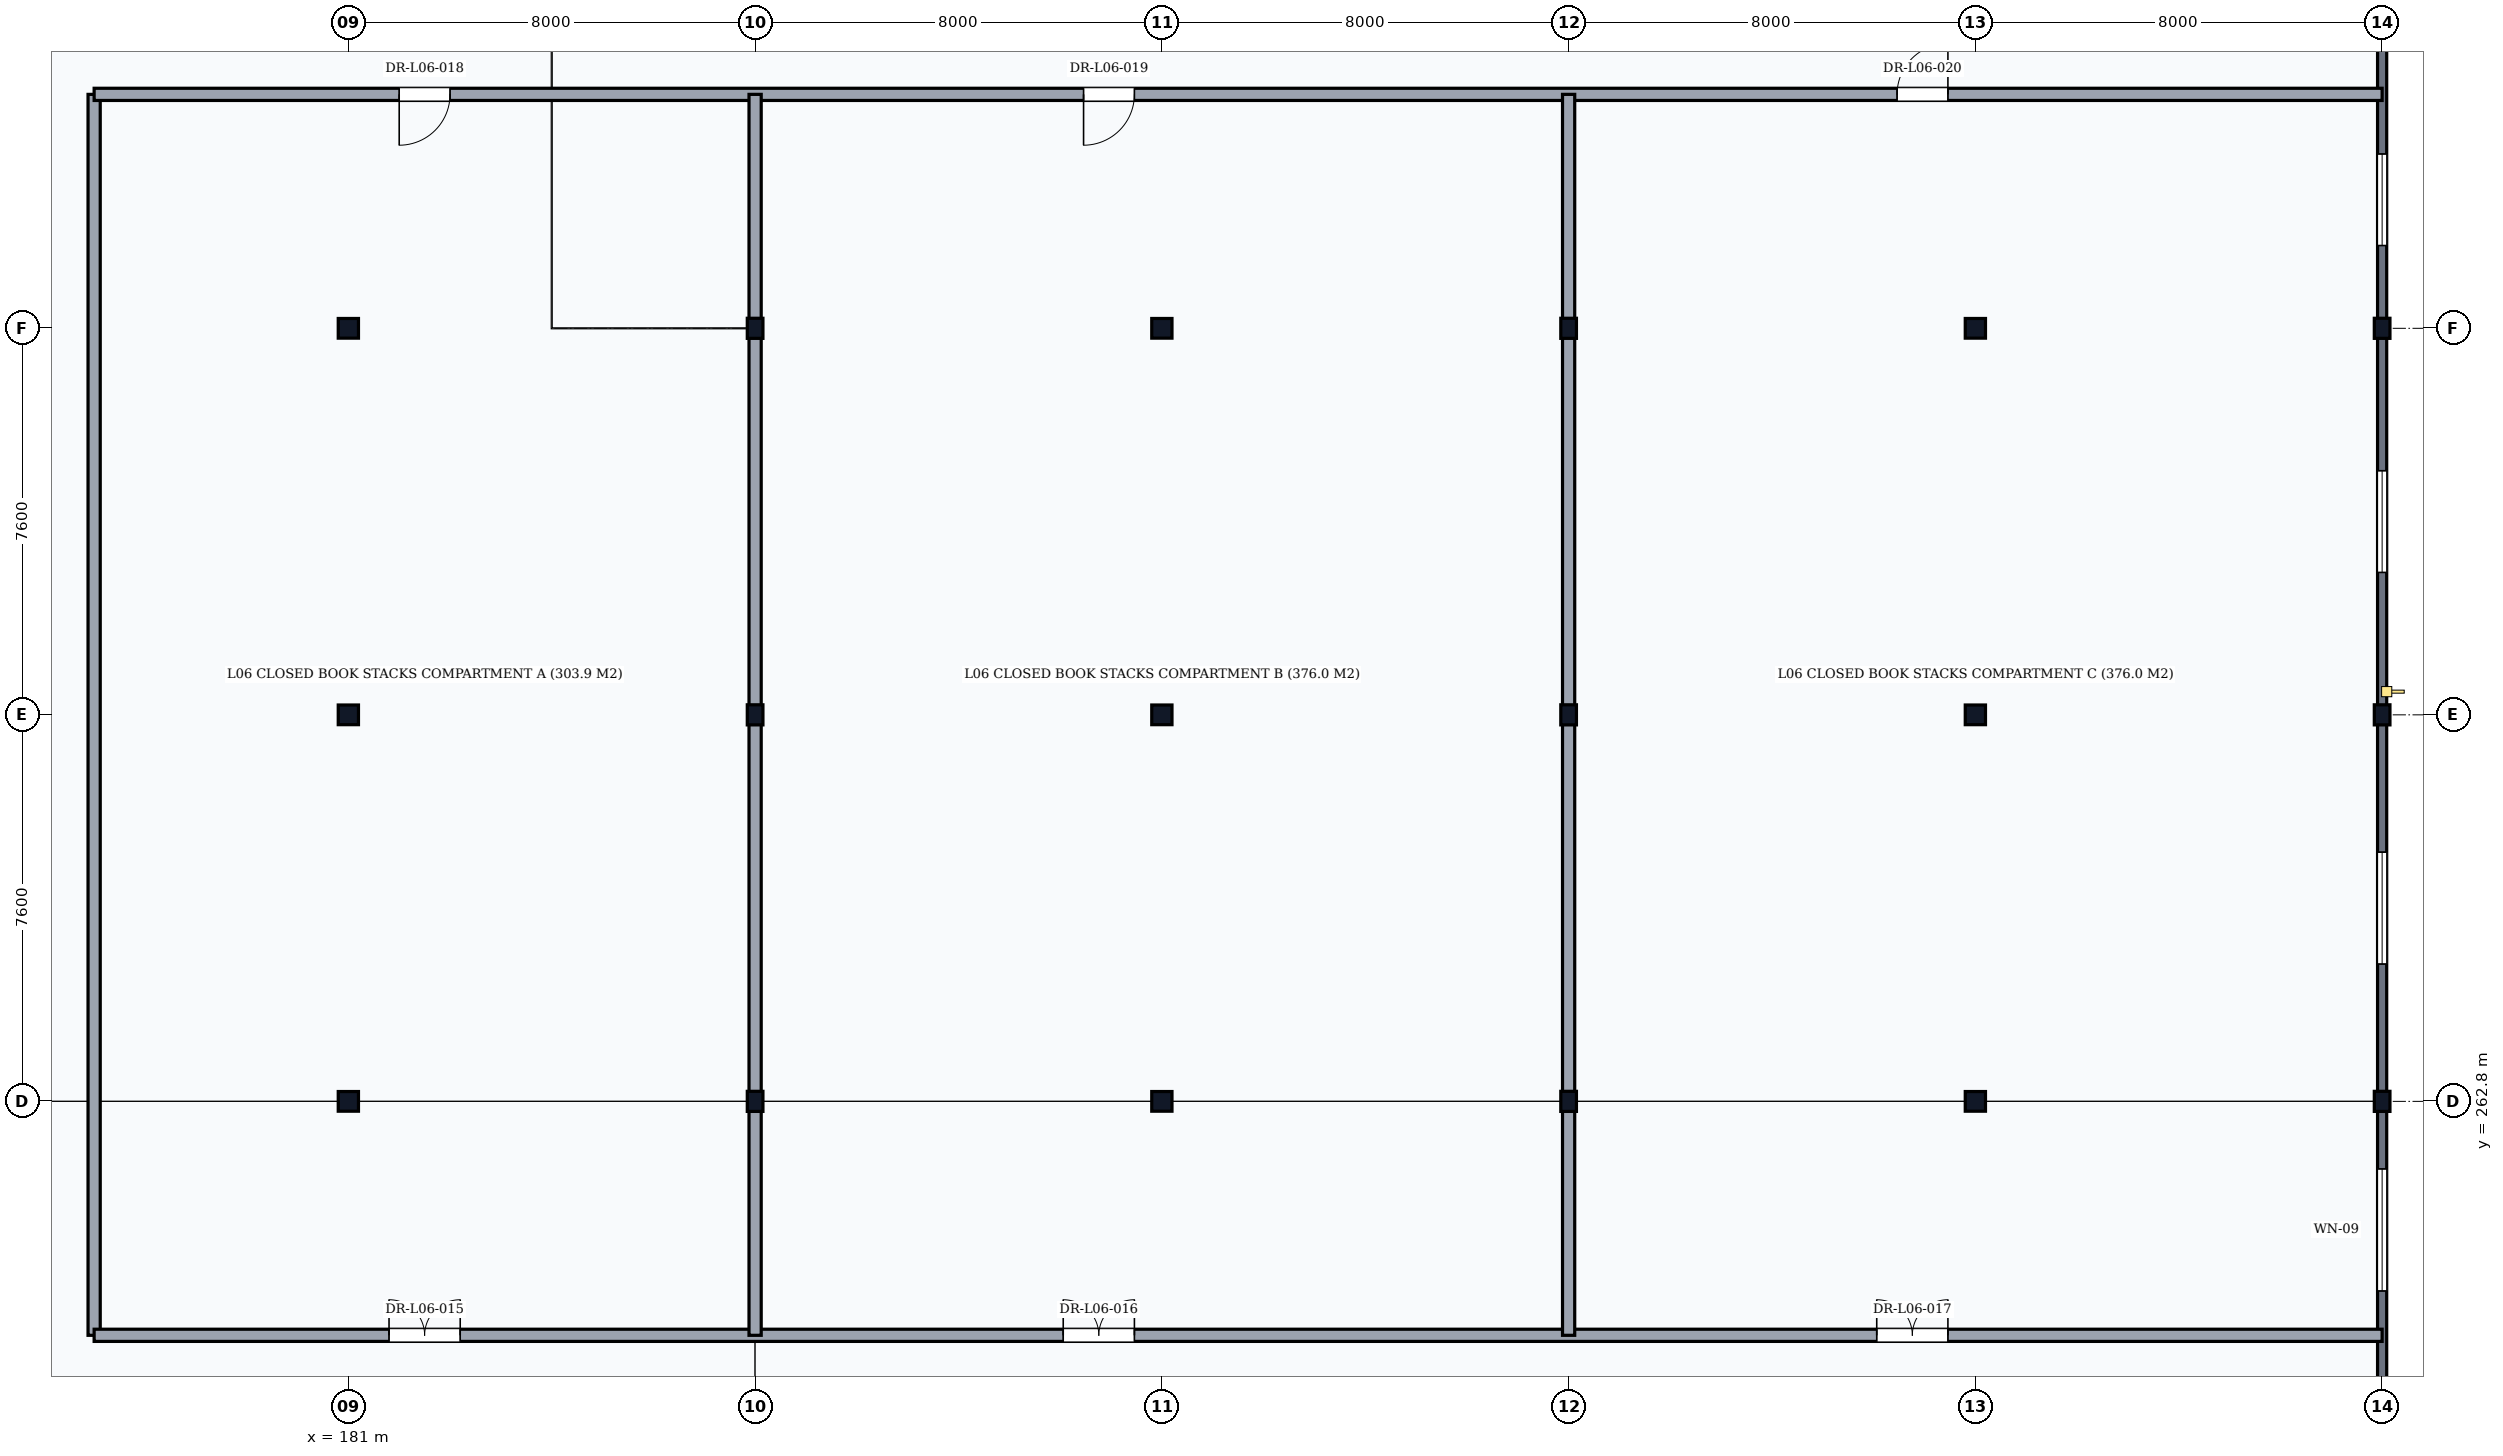
"""IFC4 building model, lengths in metres.
Left out: names, types, materials, properties, quantities, classifications, styles, units other than length and angle.
Written with IfcOpenShell. Run it as: python <this file> out.ifc"""

import sys

from ifc_helpers import new_model, si_unit, direction, frame, frame_2d, origin, origin_2d, place, context, subcontext, project, spatial, rectangle, i_section, extrude, element, fill, save


model = new_model("IFC4")
c1 = context("Model", 3, precision=1e-05, world=origin(), true_north=direction((0.0, 1.0)))
c2 = subcontext(c1, "Body", "Model", "MODEL_VIEW")
j1 = project(units=[si_unit("LENGTHUNIT", "METRE"), si_unit("PLANEANGLEUNIT", "RADIAN")], contexts=[c1])
p1 = place(None, origin())
s1 = spatial("IfcSite", under=j1, at=p1, CompositionType="ELEMENT")
p2 = place(p1, origin())
s2 = spatial("IfcBuilding", under=s1, at=p2, CompositionType="ELEMENT")
p3 = place(p2, frame((0.0, 0.0, 24.3)))
s3 = spatial("IfcBuildingStorey", under=s2, at=p3, CompositionType="ELEMENT", Elevation=24.3)
for number, where, z_axis, x_axis in (
    (1, (181.0, 262.8, 0.0), (0.0, 0.0, 1.0), (1.0, 0.0, 0.0)),
    (2, (181.0, 270.4, 0.0), (0.0, 0.0, 1.0), (1.0, 0.0, 0.0)),
    (3, (181.0, 278.0, 0.0), (0.0, 0.0, 1.0), (1.0, 0.0, 0.0)),
):
    element("IfcColumn", number, at=place(p3, frame(where, z_axis=z_axis, x_axis=x_axis)), inside=s3, PredefinedType="COLUMN", context=c2, shape_type="SweptSolid", body=[
        extrude(i_section(OverallWidth=0.398, OverallDepth=0.387, WebThickness=0.021, FlangeThickness=0.033, FilletRadius=0.015, at=origin_2d()), origin(), (0.0, 0.0, 1.0), 3.9),
    ])
for number, where, z_axis, x_axis in (
    (4, (189.0, 262.8, 0.0), (0.0, 0.0, 1.0), (1.0, 0.0, 0.0)),
    (5, (189.0, 270.4, 0.0), (0.0, 0.0, 1.0), (1.0, 0.0, 0.0)),
    (6, (189.0, 278.0, 0.0), (0.0, 0.0, 1.0), (1.0, 0.0, 0.0)),
):
    element("IfcColumn", number, at=place(p3, frame(where, z_axis=z_axis, x_axis=x_axis)), inside=s3, PredefinedType="COLUMN", context=c2, shape_type="SweptSolid", body=[
        extrude(i_section(OverallWidth=0.308, OverallDepth=0.395, WebThickness=0.021, FlangeThickness=0.04, FilletRadius=0.027, at=origin_2d()), origin(), (0.0, 0.0, 1.0), 3.9),
    ])
for number, where, z_axis, x_axis in (
    (7, (197.0, 262.8, 0.0), (0.0, 0.0, 1.0), (1.0, 0.0, 0.0)),
    (8, (197.0, 270.4, 0.0), (0.0, 0.0, 1.0), (1.0, 0.0, 0.0)),
    (9, (197.0, 278.0, 0.0), (0.0, 0.0, 1.0), (1.0, 0.0, 0.0)),
):
    element("IfcColumn", number, at=place(p3, frame(where, z_axis=z_axis, x_axis=x_axis)), inside=s3, PredefinedType="COLUMN", context=c2, shape_type="SweptSolid", body=[
        extrude(i_section(OverallWidth=0.398, OverallDepth=0.387, WebThickness=0.021, FlangeThickness=0.033, FilletRadius=0.015, at=origin_2d()), origin(), (0.0, 0.0, 1.0), 3.9),
    ])
for number, where, z_axis, x_axis in (
    (10, (205.0, 262.8, 0.0), (0.0, 0.0, 1.0), (1.0, 0.0, 0.0)),
    (11, (205.0, 270.4, 0.0), (0.0, 0.0, 1.0), (1.0, 0.0, 0.0)),
    (12, (205.0, 278.0, 0.0), (0.0, 0.0, 1.0), (1.0, 0.0, 0.0)),
):
    element("IfcColumn", number, at=place(p3, frame(where, z_axis=z_axis, x_axis=x_axis)), inside=s3, PredefinedType="COLUMN", context=c2, shape_type="SweptSolid", body=[
        extrude(i_section(OverallWidth=0.308, OverallDepth=0.395, WebThickness=0.021, FlangeThickness=0.04, FilletRadius=0.027, at=origin_2d()), origin(), (0.0, 0.0, 1.0), 3.9),
    ])
for number, where, z_axis, x_axis in (
    (13, (213.0, 262.8, 0.0), (0.0, 0.0, 1.0), (1.0, 0.0, 0.0)),
    (14, (213.0, 270.4, 0.0), (0.0, 0.0, 1.0), (1.0, 0.0, 0.0)),
    (15, (213.0, 278.0, 0.0), (0.0, 0.0, 1.0), (1.0, 0.0, 0.0)),
):
    element("IfcColumn", number, at=place(p3, frame(where, z_axis=z_axis, x_axis=x_axis)), inside=s3, PredefinedType="COLUMN", context=c2, shape_type="SweptSolid", body=[
        extrude(i_section(OverallWidth=0.398, OverallDepth=0.387, WebThickness=0.021, FlangeThickness=0.033, FilletRadius=0.015, at=origin_2d()), origin(), (0.0, 0.0, 1.0), 3.9),
    ])
for number, where, z_axis, x_axis in (
    (16, (221.0, 262.8, 0.0), (0.0, 0.0, 1.0), (1.0, 0.0, 0.0)),
    (17, (221.0, 270.4, 0.0), (0.0, 0.0, 1.0), (1.0, 0.0, 0.0)),
    (18, (221.0, 278.0, 0.0), (0.0, 0.0, 1.0), (1.0, 0.0, 0.0)),
):
    element("IfcColumn", number, at=place(p3, frame(where, z_axis=z_axis, x_axis=x_axis)), inside=s3, PredefinedType="COLUMN", context=c2, shape_type="SweptSolid", body=[
        extrude(i_section(OverallWidth=0.308, OverallDepth=0.395, WebThickness=0.021, FlangeThickness=0.04, FilletRadius=0.027, at=origin_2d()), origin(), (0.0, 0.0, 1.0), 3.9),
    ])
p4 = place(p3, frame((221.0, 255.206, 0.0), z_axis=(0.0, 0.0, 1.0), x_axis=(0.0, 1.0, 0.0)))
e19 = element("IfcWall", 19, at=p4, inside=s3, PredefinedType="SOLIDWALL", context=c2, shape_type="SweptSolid", body=[
    extrude(rectangle(XDim=7.588, YDim=0.18, at=frame_2d((3.794, 0.0))), origin(), (0.0, 0.0, 1.0), 3.388),
])
p5 = place(p4, frame((3.866, 0.0, 0.95)))
e20 = element("IfcOpeningElement", 20, at=p5, cuts=e19, PredefinedType="OPENING", context=c2, shape_type="SweptSolid", body=[
    extrude(rectangle(XDim=2.4, YDim=2.2, at=frame_2d((1.2, 1.1))), frame((0.0, 0.105, 0.0), z_axis=(0.0, -1.0, 0.0), x_axis=(1.0, 0.0, 0.0)), (0.0, 0.0, 1.0), 0.21),
])
p6 = place(p3, frame((221.0, 262.806, 0.0), z_axis=(0.0, 0.0, 1.0), x_axis=(0.0, 1.0, 0.0)))
e21 = element("IfcWall", 21, at=p6, inside=s3, PredefinedType="SOLIDWALL", context=c2, shape_type="SweptSolid", body=[
    extrude(rectangle(XDim=7.588, YDim=0.18, at=frame_2d((3.794, 0.0))), origin(), (0.0, 0.0, 1.0), 3.388),
])
p7 = place(p6, frame((2.694, 0.0, 0.95)))
e22 = element("IfcOpeningElement", 22, at=p7, cuts=e21, PredefinedType="OPENING", context=c2, shape_type="SweptSolid", body=[
    extrude(rectangle(XDim=2.2, YDim=2.1, at=frame_2d((1.1, 1.05))), frame((0.0, 0.105, 0.0), z_axis=(0.0, -1.0, 0.0), x_axis=(1.0, 0.0, 0.0)), (0.0, 0.0, 1.0), 0.21),
])
p8 = place(p3, frame((221.0, 270.406, 0.0), z_axis=(0.0, 0.0, 1.0), x_axis=(0.0, 1.0, 0.0)))
e23 = element("IfcWall", 23, at=p8, inside=s3, PredefinedType="SOLIDWALL", context=c2, shape_type="SweptSolid", body=[
    extrude(rectangle(XDim=7.588, YDim=0.18, at=frame_2d((3.794, 0.0))), origin(), (0.0, 0.0, 1.0), 3.388),
])
p9 = place(p8, frame((2.794, 0.0, 0.95)))
e24 = element("IfcOpeningElement", 24, at=p9, cuts=e23, PredefinedType="OPENING", context=c2, shape_type="SweptSolid", body=[
    extrude(rectangle(XDim=2.0, YDim=2.1, at=frame_2d((1.0, 1.05))), frame((0.0, 0.105, 0.0), z_axis=(0.0, -1.0, 0.0), x_axis=(1.0, 0.0, 0.0)), (0.0, 0.0, 1.0), 0.21),
])
p10 = place(p3, frame((221.0, 278.006, 0.0), z_axis=(0.0, 0.0, 1.0), x_axis=(0.0, 1.0, 0.0)))
e25 = element("IfcWall", 25, at=p10, inside=s3, PredefinedType="SOLIDWALL", context=c2, shape_type="SweptSolid", body=[
    extrude(rectangle(XDim=7.588, YDim=0.18, at=frame_2d((3.794, 0.0))), origin(), (0.0, 0.0, 1.0), 3.388),
])
p11 = place(p10, frame((1.622, 0.0, 0.95)))
e26 = element("IfcOpeningElement", 26, at=p11, cuts=e25, PredefinedType="OPENING", context=c2, shape_type="SweptSolid", body=[
    extrude(rectangle(XDim=1.8, YDim=2.0, at=frame_2d((0.9, 1.0))), frame((0.0, 0.105, 0.0), z_axis=(0.0, -1.0, 0.0), x_axis=(1.0, 0.0, 0.0)), (0.0, 0.0, 1.0), 0.21),
])
p12 = place(p3, frame((176.0, 258.2, 0.0), z_axis=(0.0, 0.0, 1.0), x_axis=(0.0, 1.0, 0.0)))
e27 = element("IfcWall", 27, at=p12, inside=s3, PredefinedType="PARTITIONING", context=c2, shape_type="SweptSolid", body=[
    extrude(rectangle(XDim=24.4, YDim=0.24, at=frame_2d((12.2, 0.0))), origin(), (0.0, 0.0, 1.0), 3.66),
])
p13 = place(p3, frame((176.0, 258.2, 0.0), z_axis=(0.0, 0.0, 1.0), x_axis=(1.0, 0.0, 0.0)))
e28 = element("IfcWall", 28, at=p13, inside=s3, PredefinedType="PARTITIONING", context=c2, shape_type="SweptSolid", body=[
    extrude(rectangle(XDim=45.0, YDim=0.24, at=frame_2d((22.5, 0.0))), origin(), (0.0, 0.0, 1.0), 3.66),
])
p14 = place(p13, frame((5.8, 0.0, 0.0)))
e29 = element("IfcOpeningElement", 29, at=p14, cuts=e28, PredefinedType="OPENING", context=c2, shape_type="SweptSolid", body=[
    extrude(rectangle(XDim=1.4, YDim=2.1, at=frame_2d((0.7, 1.05))), frame((0.0, 0.135, 0.0), z_axis=(0.0, -1.0, 0.0), x_axis=(1.0, 0.0, 0.0)), (0.0, 0.0, 1.0), 0.27),
])
p15 = place(p13, frame((19.06, 0.0, 0.0)))
e30 = element("IfcOpeningElement", 30, at=p15, cuts=e28, PredefinedType="OPENING", context=c2, shape_type="SweptSolid", body=[
    extrude(rectangle(XDim=1.4, YDim=2.1, at=frame_2d((0.7, 1.05))), frame((0.0, 0.135, 0.0), z_axis=(0.0, -1.0, 0.0), x_axis=(1.0, 0.0, 0.0)), (0.0, 0.0, 1.0), 0.27),
])
p16 = place(p13, frame((35.06, 0.0, 0.0)))
e31 = element("IfcOpeningElement", 31, at=p16, cuts=e28, PredefinedType="OPENING", context=c2, shape_type="SweptSolid", body=[
    extrude(rectangle(XDim=1.4, YDim=2.1, at=frame_2d((0.7, 1.05))), frame((0.0, 0.135, 0.0), z_axis=(0.0, -1.0, 0.0), x_axis=(1.0, 0.0, 0.0)), (0.0, 0.0, 1.0), 0.27),
])
p17 = place(p3, frame((176.0, 282.6, 0.0), z_axis=(0.0, 0.0, 1.0), x_axis=(1.0, 0.0, 0.0)))
e32 = element("IfcWall", 32, at=p17, inside=s3, PredefinedType="PARTITIONING", context=c2, shape_type="SweptSolid", body=[
    extrude(rectangle(XDim=45.0, YDim=0.24, at=frame_2d((22.5, 0.0))), origin(), (0.0, 0.0, 1.0), 3.66),
])
p18 = place(p17, frame((6.0, 0.0, 0.0)))
e33 = element("IfcOpeningElement", 33, at=p18, cuts=e32, PredefinedType="OPENING", context=c2, shape_type="SweptSolid", body=[
    extrude(rectangle(XDim=1.0, YDim=2.1, at=frame_2d((0.5, 1.05))), frame((0.0, 0.135, 0.0), z_axis=(0.0, -1.0, 0.0), x_axis=(1.0, 0.0, 0.0)), (0.0, 0.0, 1.0), 0.27),
])
p19 = place(p17, frame((19.46, 0.0, 0.0)))
e34 = element("IfcOpeningElement", 34, at=p19, cuts=e32, PredefinedType="OPENING", context=c2, shape_type="SweptSolid", body=[
    extrude(rectangle(XDim=1.0, YDim=2.1, at=frame_2d((0.5, 1.05))), frame((0.0, 0.135, 0.0), z_axis=(0.0, -1.0, 0.0), x_axis=(1.0, 0.0, 0.0)), (0.0, 0.0, 1.0), 0.27),
])
p20 = place(p17, frame((35.46, 0.0, 0.0)))
e35 = element("IfcOpeningElement", 35, at=p20, cuts=e32, PredefinedType="OPENING", context=c2, shape_type="SweptSolid", body=[
    extrude(rectangle(XDim=1.0, YDim=2.1, at=frame_2d((0.5, 1.05))), frame((0.0, 0.135, 0.0), z_axis=(0.0, -1.0, 0.0), x_axis=(1.0, 0.0, 0.0)), (0.0, 0.0, 1.0), 0.27),
])
for number, where, z_axis, x_axis in (
    (36, (189.0, 258.2, 0.0), (0.0, 0.0, 1.0), (0.0, 1.0, 0.0)),
    (37, (205.0, 258.2, 0.0), (0.0, 0.0, 1.0), (0.0, 1.0, 0.0)),
):
    element("IfcWall", number, at=place(p3, frame(where, z_axis=z_axis, x_axis=x_axis)), inside=s3, PredefinedType="PARTITIONING", context=c2, shape_type="SweptSolid", body=[
        extrude(rectangle(XDim=24.4, YDim=0.24, at=frame_2d((12.2, 0.0))), origin(), (0.0, 0.0, 1.0), 3.208),
    ])
p21 = place(p5, origin())
e38 = element("IfcWindow", 38, at=p21, inside=s3, PartitioningType="DOUBLE_PANEL_VERTICAL", PredefinedType="WINDOW", context=c2, shape_type="SweptSolid", body=[
    extrude(rectangle(XDim=2.4, YDim=2.2, at=frame_2d((1.2, 1.1))), frame((0.0, 0.03, 0.0), z_axis=(0.0, -1.0, 0.0), x_axis=(1.0, 0.0, 0.0)), (0.0, 0.0, 1.0), 0.06),
])
fill(e20, e38)
p22 = place(p7, origin())
e39 = element("IfcWindow", 39, at=p22, inside=s3, PartitioningType="DOUBLE_PANEL_VERTICAL", PredefinedType="WINDOW", context=c2, shape_type="SweptSolid", body=[
    extrude(rectangle(XDim=2.2, YDim=2.1, at=frame_2d((1.1, 1.05))), frame((0.0, 0.03, 0.0), z_axis=(0.0, -1.0, 0.0), x_axis=(1.0, 0.0, 0.0)), (0.0, 0.0, 1.0), 0.06),
])
fill(e22, e39)
p23 = place(p9, origin())
e40 = element("IfcWindow", 40, at=p23, inside=s3, PartitioningType="DOUBLE_PANEL_VERTICAL", PredefinedType="WINDOW", context=c2, shape_type="SweptSolid", body=[
    extrude(rectangle(XDim=2.0, YDim=2.1, at=frame_2d((1.0, 1.05))), frame((0.0, 0.03, 0.0), z_axis=(0.0, -1.0, 0.0), x_axis=(1.0, 0.0, 0.0)), (0.0, 0.0, 1.0), 0.06),
])
fill(e24, e40)
p24 = place(p11, origin())
e41 = element("IfcWindow", 41, at=p24, inside=s3, PartitioningType="DOUBLE_PANEL_VERTICAL", PredefinedType="WINDOW", context=c2, shape_type="SweptSolid", body=[
    extrude(rectangle(XDim=1.8, YDim=2.0, at=frame_2d((0.9, 1.0))), frame((0.0, 0.03, 0.0), z_axis=(0.0, -1.0, 0.0), x_axis=(1.0, 0.0, 0.0)), (0.0, 0.0, 1.0), 0.06),
])
fill(e26, e41)
p25 = place(p14, origin())
e42 = element("IfcDoor", 42, at=p25, inside=s3, OperationType="DOUBLE_DOOR_SINGLE_SWING", PredefinedType="DOOR", context=c2, shape_type="SweptSolid", body=[
    extrude(rectangle(XDim=1.4, YDim=2.1, at=frame_2d((0.7, 1.05))), frame((0.0, 0.025, 0.0), z_axis=(0.0, -1.0, 0.0), x_axis=(1.0, 0.0, 0.0)), (0.0, 0.0, 1.0), 0.05),
])
fill(e29, e42)
p26 = place(p15, origin())
e43 = element("IfcDoor", 43, at=p26, inside=s3, OperationType="DOUBLE_DOOR_SINGLE_SWING", PredefinedType="DOOR", context=c2, shape_type="SweptSolid", body=[
    extrude(rectangle(XDim=1.4, YDim=2.1, at=frame_2d((0.7, 1.05))), frame((0.0, 0.025, 0.0), z_axis=(0.0, -1.0, 0.0), x_axis=(1.0, 0.0, 0.0)), (0.0, 0.0, 1.0), 0.05),
])
fill(e30, e43)
p27 = place(p16, origin())
e44 = element("IfcDoor", 44, at=p27, inside=s3, OperationType="DOUBLE_DOOR_SINGLE_SWING", PredefinedType="DOOR", context=c2, shape_type="SweptSolid", body=[
    extrude(rectangle(XDim=1.4, YDim=2.1, at=frame_2d((0.7, 1.05))), frame((0.0, 0.025, 0.0), z_axis=(0.0, -1.0, 0.0), x_axis=(1.0, 0.0, 0.0)), (0.0, 0.0, 1.0), 0.05),
])
fill(e31, e44)
p28 = place(p18, frame((1.0, 0.0, 0.0), z_axis=(0.0, 0.0, 1.0), x_axis=(-1.0, 0.0, 0.0)))
e45 = element("IfcDoor", 45, at=p28, inside=s3, OperationType="SINGLE_SWING_RIGHT", PredefinedType="DOOR", context=c2, shape_type="SweptSolid", body=[
    extrude(rectangle(XDim=1.0, YDim=2.1, at=frame_2d((0.5, 1.05))), frame((0.0, 0.025, 0.0), z_axis=(0.0, -1.0, 0.0), x_axis=(1.0, 0.0, 0.0)), (0.0, 0.0, 1.0), 0.05),
])
fill(e33, e45)
p29 = place(p19, frame((1.0, 0.0, 0.0), z_axis=(0.0, 0.0, 1.0), x_axis=(-1.0, 0.0, 0.0)))
e46 = element("IfcDoor", 46, at=p29, inside=s3, OperationType="SINGLE_SWING_RIGHT", PredefinedType="DOOR", context=c2, shape_type="SweptSolid", body=[
    extrude(rectangle(XDim=1.0, YDim=2.1, at=frame_2d((0.5, 1.05))), frame((0.0, 0.025, 0.0), z_axis=(0.0, -1.0, 0.0), x_axis=(1.0, 0.0, 0.0)), (0.0, 0.0, 1.0), 0.05),
])
fill(e34, e46)
p30 = place(p20, frame((1.0, 0.0, 0.0), z_axis=(0.0, 0.0, 1.0), x_axis=(-1.0, 0.0, 0.0)))
e47 = element("IfcDoor", 47, at=p30, inside=s3, OperationType="SINGLE_SWING_LEFT", PredefinedType="DOOR", context=c2, shape_type="SweptSolid", body=[
    extrude(rectangle(XDim=1.0, YDim=2.1, at=frame_2d((0.5, 1.05))), frame((0.0, 0.025, 0.0), z_axis=(0.0, -1.0, 0.0), x_axis=(1.0, 0.0, 0.0)), (0.0, 0.0, 1.0), 0.05),
])
fill(e35, e47)
save(model, sys.argv[1])
